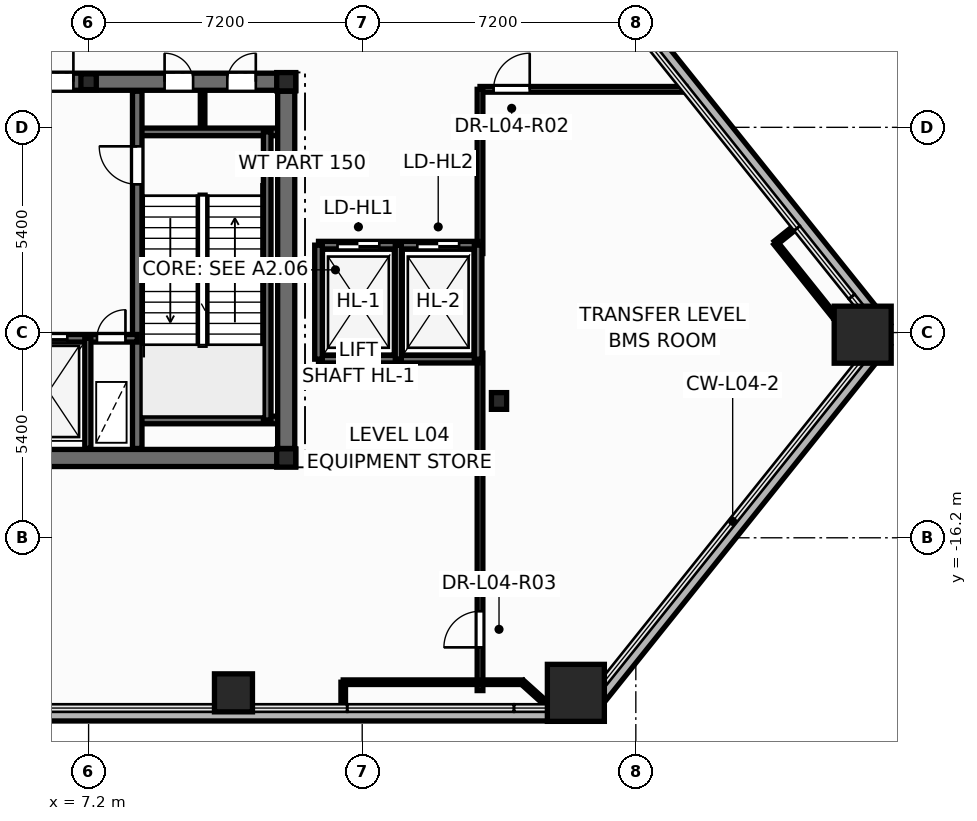
"""IFC4 building model, lengths in metres.
Left out: names, types, materials, properties, quantities, classifications, styles, units other than length and angle.
Written with IfcOpenShell. Run it as: python <this file> out.ifc"""

import sys

from ifc_helpers import new_model, si_unit, direction, frame, frame_2d, origin, origin_2d, place, context, subcontext, project, spatial, rectangle, hollow_rectangle, hollow_circle, i_section, extrude, element, fill, save


model = new_model("IFC4")
c1 = context("Model", 3, precision=1e-05, world=origin(), true_north=direction((0.0, 1.0)))
c2 = subcontext(c1, "Body", "Model", "MODEL_VIEW")
j1 = project(units=[si_unit("LENGTHUNIT", "METRE"), si_unit("PLANEANGLEUNIT", "RADIAN")], contexts=[c1])
p1 = place(None, origin())
s1 = spatial("IfcSite", under=j1, at=p1, CompositionType="ELEMENT")
p2 = place(p1, origin())
s2 = spatial("IfcBuilding", under=s1, at=p2, CompositionType="ELEMENT")
p3 = place(p2, frame((0.0, 0.0, 18.9)))
s3 = spatial("IfcBuildingStorey", under=s2, at=p3, CompositionType="ELEMENT", Elevation=18.9)
for number, where, z_axis, x_axis in (
    (1, (20.022, -20.28, 0.0), (0.0, 0.0, 1.0), (1.0, 0.0, 0.0)),
    (2, (27.57, -10.856, 0.0), (0.0, 0.0, 1.0), (1.0, 0.0, 0.0)),
):
    element("IfcColumn", number, at=place(p3, frame(where, z_axis=z_axis, x_axis=x_axis)), inside=s3, PredefinedType="COLUMN", context=c2, shape_type="SweptSolid", body=[
        extrude(hollow_rectangle(XDim=1.5, YDim=1.5, WallThickness=0.075, at=origin_2d()), origin(), (0.0, 0.0, 1.0), 5.4),
    ])
p4 = place(p3, frame((11.012, -20.28, 0.0), z_axis=(0.0, 0.0, 1.0), x_axis=(1.0, 0.0, 0.0)))
e3 = element("IfcColumn", 3, at=p4, inside=s3, PredefinedType="COLUMN", context=c2, shape_type="SweptSolid", body=[
    extrude(hollow_circle(Radius=0.5, WallThickness=0.045, at=origin_2d()), origin(), (0.0, 0.0, 1.0), 5.4),
])
for number, where, z_axis, x_axis in (
    (4, (12.4, -14.1, 0.0), (0.0, 0.0, 1.0), (1.0, 0.0, 0.0)),
    (5, (12.4, -4.2, 0.0), (0.0, 0.0, 1.0), (1.0, 0.0, 0.0)),
):
    element("IfcColumn", number, at=place(p3, frame(where, z_axis=z_axis, x_axis=x_axis)), inside=s3, PredefinedType="COLUMN", context=c2, shape_type="SweptSolid", body=[
        extrude(i_section(OverallWidth=0.5, OverallDepth=0.482, WebThickness=0.04, FlangeThickness=0.045, at=origin_2d()), origin(), (0.0, 0.0, 1.0), 5.4),
    ])
p5 = place(p3, frame((7.2, -4.2, 0.0), z_axis=(0.0, 0.0, 1.0), x_axis=(1.0, 0.0, 0.0)))
e6 = element("IfcColumn", 6, at=p5, inside=s3, PredefinedType="PILASTER", context=c2, shape_type="SweptSolid", body=[
    extrude(i_section(OverallWidth=0.405, OverallDepth=0.414, WebThickness=0.022, FlangeThickness=0.032, at=origin_2d()), origin(), (0.0, 0.0, 1.0), 5.4),
])
p6 = place(p3, frame((18.0, -12.6, 0.0), z_axis=(0.0, 0.0, 1.0), x_axis=(1.0, 0.0, 0.0)))
e7 = element("IfcColumn", 7, at=p6, inside=s3, PredefinedType="COLUMN", context=c2, shape_type="SweptSolid", body=[
    extrude(i_section(OverallWidth=0.4, OverallDepth=0.44, WebThickness=0.028, FlangeThickness=0.04, at=origin_2d()), origin(), (0.0, 0.0, 1.0), 5.4),
])
p7 = place(p3, frame((-20.135, -20.84, -0.2), z_axis=(0.0, 0.0, 1.0), x_axis=(1.0, 0.0, 0.0)))
e8 = element("IfcWall", 8, at=p7, inside=s3, PredefinedType="PARAPET", context=c2, shape_type="SweptSolid", body=[
    extrude(rectangle(XDim=40.269, YDim=0.36, at=frame_2d((20.135, 0.0))), origin(), (0.0, 0.0, 1.0), 0.38),
])
p8 = place(p3, frame((20.389, -20.718, -0.2), z_axis=(0.0, 0.0, 1.0), x_axis=(0.625119050196, 0.78052941846, 0.0)))
e9 = element("IfcWall", 9, at=p8, inside=s3, PredefinedType="PARAPET", context=c2, shape_type="SweptSolid", body=[
    extrude(rectangle(XDim=12.426, YDim=0.36, at=frame_2d((6.213, 0.0))), origin(), (0.0, 0.0, 1.0), 0.38),
])
p9 = place(p3, frame((28.157, -10.694, -0.2), z_axis=(0.0, 0.0, 1.0), x_axis=(-0.625116772483, 0.780531242655, 0.0)))
e10 = element("IfcWall", 10, at=p9, inside=s3, PredefinedType="PARAPET", context=c2, shape_type="SweptSolid", body=[
    extrude(rectangle(XDim=32.115, YDim=0.36, at=frame_2d((16.058, 0.0))), origin(), (0.0, 0.0, 1.0), 0.38),
])
p10 = place(p3, frame((10.2, -5.52, 0.0), z_axis=(0.0, 0.0, 1.0), x_axis=(0.0, 1.0, 0.0)))
e11 = element("IfcWall", 11, at=p10, inside=s3, PredefinedType="PARTITIONING", context=c2, shape_type="SweptSolid", body=[
    extrude(rectangle(XDim=1.12, YDim=0.12, at=frame_2d((0.56, 0.0))), origin(), (0.0, 0.0, 1.0), 5.15),
])
p11 = place(p3, frame((-12.65, -14.1, 0.0), z_axis=(0.0, 0.0, 1.0), x_axis=(1.0, 0.0, 0.0)))
e12 = element("IfcWall", 12, at=p11, inside=s3, PredefinedType="SHEAR", context=c2, shape_type="SweptSolid", body=[
    extrude(rectangle(XDim=25.3, YDim=0.45, at=frame_2d((12.65, 0.0))), origin(), (0.0, 0.0, 1.0), 5.4),
])
p12 = place(p3, frame((-12.65, -4.2, 0.0), z_axis=(0.0, 0.0, 1.0), x_axis=(1.0, 0.0, 0.0)))
e13 = element("IfcWall", 13, at=p12, inside=s3, PredefinedType="SHEAR", context=c2, shape_type="SweptSolid", body=[
    extrude(rectangle(XDim=25.3, YDim=0.45, at=frame_2d((12.65, 0.0))), origin(), (0.0, 0.0, 1.0), 5.4),
])
p13 = place(p12, frame((1.85, 0.0, 0.0)))
e14 = element("IfcOpeningElement", 14, at=p13, cuts=e13, PredefinedType="OPENING", context=c2, shape_type="SweptSolid", body=[
    extrude(rectangle(XDim=0.756, YDim=2.054, at=frame_2d((0.375, 1.027))), frame((0.0, 0.235, 0.0), z_axis=(0.0, -1.0, 0.0), x_axis=(1.0, 0.0, 0.0)), (0.0, 0.0, 1.0), 0.47),
])
p14 = place(p12, frame((21.85, 0.0, 0.0)))
e15 = element("IfcOpeningElement", 15, at=p14, cuts=e13, PredefinedType="OPENING", context=c2, shape_type="SweptSolid", body=[
    extrude(rectangle(XDim=0.756, YDim=2.054, at=frame_2d((0.375, 1.027))), frame((0.0, 0.235, 0.0), z_axis=(0.0, -1.0, 0.0), x_axis=(1.0, 0.0, 0.0)), (0.0, 0.0, 1.0), 0.47),
])
p15 = place(p12, frame((23.5, 0.0, 0.0)))
e16 = element("IfcOpeningElement", 16, at=p15, cuts=e13, PredefinedType="OPENING", context=c2, shape_type="SweptSolid", body=[
    extrude(rectangle(XDim=0.756, YDim=2.054, at=frame_2d((0.375, 1.027))), frame((0.0, 0.235, 0.0), z_axis=(0.0, -1.0, 0.0), x_axis=(1.0, 0.0, 0.0)), (0.0, 0.0, 1.0), 0.47),
])
p16 = place(p12, frame((5.85, 0.0, 0.0)))
e17 = element("IfcOpeningElement", 17, at=p16, cuts=e13, PredefinedType="OPENING", context=c2, shape_type="SweptSolid", body=[
    extrude(rectangle(XDim=1.006, YDim=2.104, at=frame_2d((0.5, 1.052))), frame((0.0, 0.235, 0.0), z_axis=(0.0, -1.0, 0.0), x_axis=(1.0, 0.0, 0.0)), (0.0, 0.0, 1.0), 0.47),
])
p17 = place(p12, frame((10.35, 0.0, 0.0)))
e18 = element("IfcOpeningElement", 18, at=p17, cuts=e13, PredefinedType="OPENING", context=c2, shape_type="SweptSolid", body=[
    extrude(rectangle(XDim=1.406, YDim=2.154, at=frame_2d((0.7, 1.077))), frame((0.0, 0.235, 0.0), z_axis=(0.0, -1.0, 0.0), x_axis=(1.0, 0.0, 0.0)), (0.0, 0.0, 1.0), 0.47),
])
p18 = place(p12, frame((18.45, 0.0, 0.0)))
e19 = element("IfcOpeningElement", 19, at=p18, cuts=e13, PredefinedType="OPENING", context=c2, shape_type="SweptSolid", body=[
    extrude(rectangle(XDim=1.006, YDim=2.104, at=frame_2d((0.5, 1.052))), frame((0.0, 0.235, 0.0), z_axis=(0.0, -1.0, 0.0), x_axis=(1.0, 0.0, 0.0)), (0.0, 0.0, 1.0), 0.47),
])
for number, where, z_axis, x_axis in (
    (20, (8.48, -5.52, 0.0), (0.0, 0.0, 1.0), (1.0, 0.0, 0.0)),
    (21, (8.48, -13.1, 0.0), (0.0, 0.0, 1.0), (1.0, 0.0, 0.0)),
):
    element("IfcWall", number, at=place(p3, frame(where, z_axis=z_axis, x_axis=x_axis)), inside=s3, PredefinedType="SOLIDWALL", context=c2, shape_type="SweptSolid", body=[
        extrude(rectangle(XDim=3.87, YDim=0.2, at=frame_2d((1.935, 0.0))), origin(), (0.0, 0.0, 1.0), 5.4),
    ])
p19 = place(p3, frame((11.9, -13.1, 0.0), z_axis=(0.0, 0.0, 1.0), x_axis=(0.0, 1.0, 0.0)))
e22 = element("IfcWall", 22, at=p19, inside=s3, PredefinedType="SOLIDWALL", context=c2, shape_type="SweptSolid", body=[
    extrude(rectangle(XDim=7.58, YDim=0.2, at=frame_2d((3.79, 0.0))), origin(), (0.0, 0.0, 1.0), 5.4),
])
p20 = place(p3, frame((8.48, -13.85, 0.0), z_axis=(0.0, 0.0, 1.0), x_axis=(0.0, 1.0, 0.0)))
e23 = element("IfcWall", 23, at=p20, inside=s3, PredefinedType="SHEAR", context=c2, shape_type="SweptSolid", body=[
    extrude(rectangle(XDim=9.4, YDim=0.25, at=frame_2d((4.7, 0.0))), origin(), (0.0, 0.0, 1.0), 5.4),
])
p21 = place(p20, frame((6.95, 0.0, 0.0)))
e24 = element("IfcOpeningElement", 24, at=p21, cuts=e23, PredefinedType="OPENING", context=c2, shape_type="SweptSolid", body=[
    extrude(rectangle(XDim=1.006, YDim=2.104, at=frame_2d((0.5, 1.052))), frame((0.0, 0.135, 0.0), z_axis=(0.0, -1.0, 0.0), x_axis=(1.0, 0.0, 0.0)), (0.0, 0.0, 1.0), 0.27),
])
p22 = place(p3, frame((5.12, -10.95, 0.0), z_axis=(0.0, 0.0, 1.0), x_axis=(1.0, 0.0, 0.0)))
e25 = element("IfcWall", 25, at=p22, inside=s3, PredefinedType="SOLIDWALL", context=c2, shape_type="SweptSolid", body=[
    extrude(rectangle(XDim=3.36, YDim=0.2, at=frame_2d((1.68, 0.0))), origin(), (0.0, 0.0, 1.0), 5.4),
])
p23 = place(p22, frame((0.42, 0.0, 0.0)))
e26 = element("IfcOpeningElement", 26, at=p23, cuts=e25, PredefinedType="OPENING", context=c2, shape_type="SweptSolid", body=[
    extrude(rectangle(XDim=1.106, YDim=2.104, at=frame_2d((0.55, 1.052))), frame((0.0, 0.11, 0.0), z_axis=(0.0, -1.0, 0.0), x_axis=(1.0, 0.0, 0.0)), (0.0, 0.0, 1.0), 0.22),
])
p24 = place(p22, frame((2.3, 0.0, 0.0)))
e27 = element("IfcOpeningElement", 27, at=p24, cuts=e25, PredefinedType="OPENING", context=c2, shape_type="SweptSolid", body=[
    extrude(rectangle(XDim=0.756, YDim=2.054, at=frame_2d((0.375, 1.027))), frame((0.0, 0.11, 0.0), z_axis=(0.0, -1.0, 0.0), x_axis=(1.0, 0.0, 0.0)), (0.0, 0.0, 1.0), 0.22),
])
p25 = place(p3, frame((7.18, -13.85, 0.0), z_axis=(0.0, 0.0, 1.0), x_axis=(0.0, 1.0, 0.0)))
e28 = element("IfcWall", 28, at=p25, inside=s3, PredefinedType="PARTITIONING", context=c2, shape_type="SweptSolid", body=[
    extrude(rectangle(XDim=2.9, YDim=0.16, at=frame_2d((1.45, 0.0))), origin(), (0.0, 0.0, 1.0), 4.175),
])
p26 = place(p3, frame((12.4, -13.85, 0.0), z_axis=(0.0, 0.0, 1.0), x_axis=(0.0, 1.0, 0.0)))
e29 = element("IfcWall", 29, at=p26, inside=s3, PredefinedType="SHEAR", context=c2, shape_type="SweptSolid", body=[
    extrude(rectangle(XDim=9.4, YDim=0.45, at=frame_2d((4.7, 0.0))), origin(), (0.0, 0.0, 1.0), 5.4),
])
p27 = place(p3, frame((17.5, -20.22, 0.0), z_axis=(0.0, 0.0, 1.0), x_axis=(0.0, 1.0, 0.0)))
e30 = element("IfcWall", 30, at=p27, inside=s3, PredefinedType="PARTITIONING", context=c2, shape_type="SweptSolid", body=[
    extrude(rectangle(XDim=8.88, YDim=0.15, at=frame_2d((4.44, 0.0))), origin(), (0.0, 0.0, 1.0), 3.675),
])
p28 = place(p27, frame((1.137, 0.0, 0.0)))
e31 = element("IfcOpeningElement", 31, at=p28, cuts=e30, PredefinedType="OPENING", context=c2, shape_type="SweptSolid", body=[
    extrude(rectangle(XDim=0.956, YDim=2.104, at=frame_2d((0.475, 1.052))), frame((0.0, 0.085, 0.0), z_axis=(0.0, -1.0, 0.0), x_axis=(1.0, 0.0, 0.0)), (0.0, 0.0, 1.0), 0.17),
])
p29 = place(p3, frame((17.5, -4.4, 0.0), z_axis=(0.0, 0.0, 1.0), x_axis=(1.0, 0.0, 0.0)))
e32 = element("IfcWall", 32, at=p29, inside=s3, PredefinedType="PARTITIONING", context=c2, shape_type="SweptSolid", body=[
    extrude(rectangle(XDim=5.412, YDim=0.15, at=frame_2d((2.706, 0.0))), origin(), (0.0, 0.0, 1.0), 4.125),
])
p30 = place(p29, frame((0.358, 0.0, 0.0)))
e33 = element("IfcOpeningElement", 33, at=p30, cuts=e32, PredefinedType="OPENING", context=c2, shape_type="SweptSolid", body=[
    extrude(rectangle(XDim=0.956, YDim=2.104, at=frame_2d((0.475, 1.052))), frame((0.0, 0.085, 0.0), z_axis=(0.0, -1.0, 0.0), x_axis=(1.0, 0.0, 0.0)), (0.0, 0.0, 1.0), 0.17),
])
p31 = place(p3, frame((13.9, -20.0, 0.0), z_axis=(0.0, 0.0, 1.0), x_axis=(1.0, 0.0, 0.0)))
e34 = element("IfcWall", 34, at=p31, inside=s3, PredefinedType="PARTITIONING", context=c2, shape_type="SweptSolid", body=[
    extrude(rectangle(XDim=4.713, YDim=0.12, at=frame_2d((2.357, 0.0))), origin(), (0.0, 0.0, 1.0), 3.675),
])
p32 = place(p3, frame((17.5, -8.72, 0.0), z_axis=(0.0, 0.0, 1.0), x_axis=(0.0, 1.0, 0.0)))
e35 = element("IfcWall", 35, at=p32, inside=s3, PredefinedType="PARTITIONING", context=c2, shape_type="SweptSolid", body=[
    extrude(rectangle(XDim=4.32, YDim=0.15, at=frame_2d((2.16, 0.0))), origin(), (0.0, 0.0, 1.0), 3.675),
])
p33 = place(p3, frame((13.25, -11.5, 0.0), z_axis=(0.0, 0.0, 1.0), x_axis=(1.0, 0.0, 0.0)))
e36 = element("IfcWall", 36, at=p33, inside=s3, PredefinedType="SOLIDWALL", context=c2, shape_type="SweptSolid", body=[
    extrude(rectangle(XDim=4.2, YDim=0.2, at=frame_2d((2.1, 0.0))), origin(), (0.0, 0.0, 1.0), 5.4),
])
p34 = place(p3, frame((13.25, -8.5, 0.0), z_axis=(0.0, 0.0, 1.0), x_axis=(1.0, 0.0, 0.0)))
e37 = element("IfcWall", 37, at=p34, inside=s3, PredefinedType="SOLIDWALL", context=c2, shape_type="SweptSolid", body=[
    extrude(rectangle(XDim=4.2, YDim=0.2, at=frame_2d((2.1, 0.0))), origin(), (0.0, 0.0, 1.0), 5.4),
])
p35 = place(p34, frame((0.5, 0.0, 0.0)))
e38 = element("IfcOpeningElement", 38, at=p35, cuts=e37, PredefinedType="OPENING", context=c2, shape_type="SweptSolid", body=[
    extrude(rectangle(XDim=1.106, YDim=2.104, at=frame_2d((0.55, 1.052))), frame((0.0, 0.11, 0.0), z_axis=(0.0, -1.0, 0.0), x_axis=(1.0, 0.0, 0.0)), (0.0, 0.0, 1.0), 0.22),
])
p36 = place(p34, frame((2.6, 0.0, 0.0)))
e39 = element("IfcOpeningElement", 39, at=p36, cuts=e37, PredefinedType="OPENING", context=c2, shape_type="SweptSolid", body=[
    extrude(rectangle(XDim=1.106, YDim=2.104, at=frame_2d((0.55, 1.052))), frame((0.0, 0.11, 0.0), z_axis=(0.0, -1.0, 0.0), x_axis=(1.0, 0.0, 0.0)), (0.0, 0.0, 1.0), 0.22),
])
for number, where, z_axis, x_axis in (
    (40, (13.25, -11.5, 0.0), (0.0, 0.0, 1.0), (0.0, 1.0, 0.0)),
    (41, (17.45, -11.5, 0.0), (0.0, 0.0, 1.0), (0.0, 1.0, 0.0)),
):
    element("IfcWall", number, at=place(p3, frame(where, z_axis=z_axis, x_axis=x_axis)), inside=s3, PredefinedType="SOLIDWALL", context=c2, shape_type="SweptSolid", body=[
        extrude(rectangle(XDim=3.0, YDim=0.2, at=frame_2d((1.5, 0.0))), origin(), (0.0, 0.0, 1.0), 5.4),
    ])
p37 = place(p3, frame((15.35, -11.5, 0.0), z_axis=(0.0, 0.0, 1.0), x_axis=(0.0, 1.0, 0.0)))
e42 = element("IfcWall", 42, at=p37, inside=s3, PredefinedType="PARTITIONING", context=c2, shape_type="SweptSolid", body=[
    extrude(rectangle(XDim=3.0, YDim=0.16, at=frame_2d((1.5, 0.0))), origin(), (0.0, 0.0, 1.0), 5.15),
])
p38 = place(p3, frame((26.823, -10.372, 0.0), z_axis=(0.0, 0.0, 1.0), x_axis=(-0.624996071722, 0.780627894923, 0.0)))
e43 = element("IfcWall", 43, at=p38, inside=s3, PredefinedType="PARTITIONING", context=c2, shape_type="SweptSolid", body=[
    extrude(rectangle(XDim=2.472, YDim=0.12, at=frame_2d((1.236, 0.0))), origin(), (0.0, 0.0, 1.0), 3.675),
])
p39 = place(p3, frame((27.661, -10.527, 0.0), z_axis=(0.0, 0.0, 1.0), x_axis=(-0.983342785939, 0.181760736526, 0.0)))
e44 = element("IfcWall", 44, at=p39, inside=s3, PredefinedType="PARTITIONING", context=c2, shape_type="SweptSolid", body=[
    extrude(rectangle(XDim=0.852, YDim=0.12, at=frame_2d((0.426, 0.0))), origin(), (0.0, 0.0, 1.0), 3.675),
])
p40 = place(p3, frame((18.614, -20.0, 0.0), z_axis=(0.0, 0.0, 1.0), x_axis=(0.74327988183, -0.668980580635, 0.0)))
e45 = element("IfcWall", 45, at=p40, inside=s3, PredefinedType="PARTITIONING", context=c2, shape_type="SweptSolid", body=[
    extrude(rectangle(XDim=0.851, YDim=0.12, at=frame_2d((0.426, 0.0))), origin(), (0.0, 0.0, 1.0), 3.675),
])
p41 = place(p3, frame((13.9, -20.67, 0.0), z_axis=(0.0, 0.0, 1.0), x_axis=(0.0, 1.0, 0.0)))
e46 = element("IfcWall", 46, at=p41, inside=s3, PredefinedType="PARTITIONING", context=c2, shape_type="SweptSolid", body=[
    extrude(rectangle(XDim=0.67, YDim=0.12, at=frame_2d((0.335, 0.0))), origin(), (0.0, 0.0, 1.0), 4.513),
])
p42 = place(p3, frame((25.278, -8.442, 0.0), z_axis=(0.0, 0.0, 1.0), x_axis=(0.780477444014, 0.625183940441, 0.0)))
e47 = element("IfcWall", 47, at=p42, inside=s3, PredefinedType="PARTITIONING", context=c2, shape_type="SweptSolid", body=[
    extrude(rectangle(XDim=0.67, YDim=0.12, at=frame_2d((0.335, 0.0))), origin(), (0.0, 0.0, 1.0), 4.513),
])
p43 = place(p21, origin())
e48 = element("IfcDoor", 48, at=p43, inside=s3, OperationType="SINGLE_SWING_RIGHT", PredefinedType="DOOR", context=c2, shape_type="SweptSolid", body=[
    extrude(rectangle(XDim=1.0, YDim=2.1, at=frame_2d((0.5, 1.05))), frame((0.0, 0.025, 0.0), z_axis=(0.0, -1.0, 0.0), x_axis=(1.0, 0.0, 0.0)), (0.0, 0.0, 1.0), 0.05),
])
fill(e24, e48)
p44 = place(p23, origin())
e49 = element("IfcDoor", 49, at=p44, inside=s3, OperationType="DOUBLE_DOOR_SLIDING", PredefinedType="DOOR", context=c2, shape_type="SweptSolid", body=[
    extrude(rectangle(XDim=1.1, YDim=2.1, at=frame_2d((0.55, 1.05))), frame((0.0, 0.025, 0.0), z_axis=(0.0, -1.0, 0.0), x_axis=(1.0, 0.0, 0.0)), (0.0, 0.0, 1.0), 0.05),
])
fill(e26, e49)
p45 = place(p24, origin())
e50 = element("IfcDoor", 50, at=p45, inside=s3, OperationType="SINGLE_SWING_RIGHT", PredefinedType="DOOR", context=c2, shape_type="SweptSolid", body=[
    extrude(rectangle(XDim=0.75, YDim=2.05, at=frame_2d((0.375, 1.025))), frame((0.0, 0.025, 0.0), z_axis=(0.0, -1.0, 0.0), x_axis=(1.0, 0.0, 0.0)), (0.0, 0.0, 1.0), 0.05),
])
fill(e27, e50)
p46 = place(p14, origin())
e51 = element("IfcDoor", 51, at=p46, inside=s3, OperationType="SINGLE_SWING_LEFT", PredefinedType="DOOR", context=c2, shape_type="SweptSolid", body=[
    extrude(rectangle(XDim=0.75, YDim=2.05, at=frame_2d((0.375, 1.025))), frame((0.0, 0.025, 0.0), z_axis=(0.0, -1.0, 0.0), x_axis=(1.0, 0.0, 0.0)), (0.0, 0.0, 1.0), 0.05),
])
fill(e15, e51)
p47 = place(p15, origin())
e52 = element("IfcDoor", 52, at=p47, inside=s3, OperationType="SINGLE_SWING_RIGHT", PredefinedType="DOOR", context=c2, shape_type="SweptSolid", body=[
    extrude(rectangle(XDim=0.75, YDim=2.05, at=frame_2d((0.375, 1.025))), frame((0.0, 0.025, 0.0), z_axis=(0.0, -1.0, 0.0), x_axis=(1.0, 0.0, 0.0)), (0.0, 0.0, 1.0), 0.05),
])
fill(e16, e52)
p48 = place(p18, origin())
e53 = element("IfcDoor", 53, at=p48, inside=s3, OperationType="SINGLE_SWING_RIGHT", PredefinedType="DOOR", context=c2, shape_type="SweptSolid", body=[
    extrude(rectangle(XDim=1.0, YDim=2.1, at=frame_2d((0.5, 1.05))), frame((0.0, 0.025, 0.0), z_axis=(0.0, -1.0, 0.0), x_axis=(1.0, 0.0, 0.0)), (0.0, 0.0, 1.0), 0.05),
])
fill(e19, e53)
p49 = place(p35, origin())
e54 = element("IfcDoor", 54, at=p49, inside=s3, OperationType="DOUBLE_DOOR_SLIDING", PredefinedType="DOOR", context=c2, shape_type="SweptSolid", body=[
    extrude(rectangle(XDim=1.1, YDim=2.1, at=frame_2d((0.55, 1.05))), frame((0.0, 0.025, 0.0), z_axis=(0.0, -1.0, 0.0), x_axis=(1.0, 0.0, 0.0)), (0.0, 0.0, 1.0), 0.05),
])
fill(e38, e54)
p50 = place(p36, origin())
e55 = element("IfcDoor", 55, at=p50, inside=s3, OperationType="DOUBLE_DOOR_SLIDING", PredefinedType="DOOR", context=c2, shape_type="SweptSolid", body=[
    extrude(rectangle(XDim=1.1, YDim=2.1, at=frame_2d((0.55, 1.05))), frame((0.0, 0.025, 0.0), z_axis=(0.0, -1.0, 0.0), x_axis=(1.0, 0.0, 0.0)), (0.0, 0.0, 1.0), 0.05),
])
fill(e39, e55)
p51 = place(p30, origin())
e56 = element("IfcDoor", 56, at=p51, inside=s3, OperationType="SINGLE_SWING_RIGHT", PredefinedType="DOOR", context=c2, shape_type="SweptSolid", body=[
    extrude(rectangle(XDim=0.95, YDim=2.1, at=frame_2d((0.475, 1.05))), frame((0.0, 0.025, 0.0), z_axis=(0.0, -1.0, 0.0), x_axis=(1.0, 0.0, 0.0)), (0.0, 0.0, 1.0), 0.05),
])
fill(e33, e56)
p52 = place(p28, origin())
e57 = element("IfcDoor", 57, at=p52, inside=s3, OperationType="SINGLE_SWING_LEFT", PredefinedType="DOOR", context=c2, shape_type="SweptSolid", body=[
    extrude(rectangle(XDim=0.95, YDim=2.1, at=frame_2d((0.475, 1.05))), frame((0.0, 0.025, 0.0), z_axis=(0.0, -1.0, 0.0), x_axis=(1.0, 0.0, 0.0)), (0.0, 0.0, 1.0), 0.05),
])
fill(e31, e57)
save(model, sys.argv[1])
